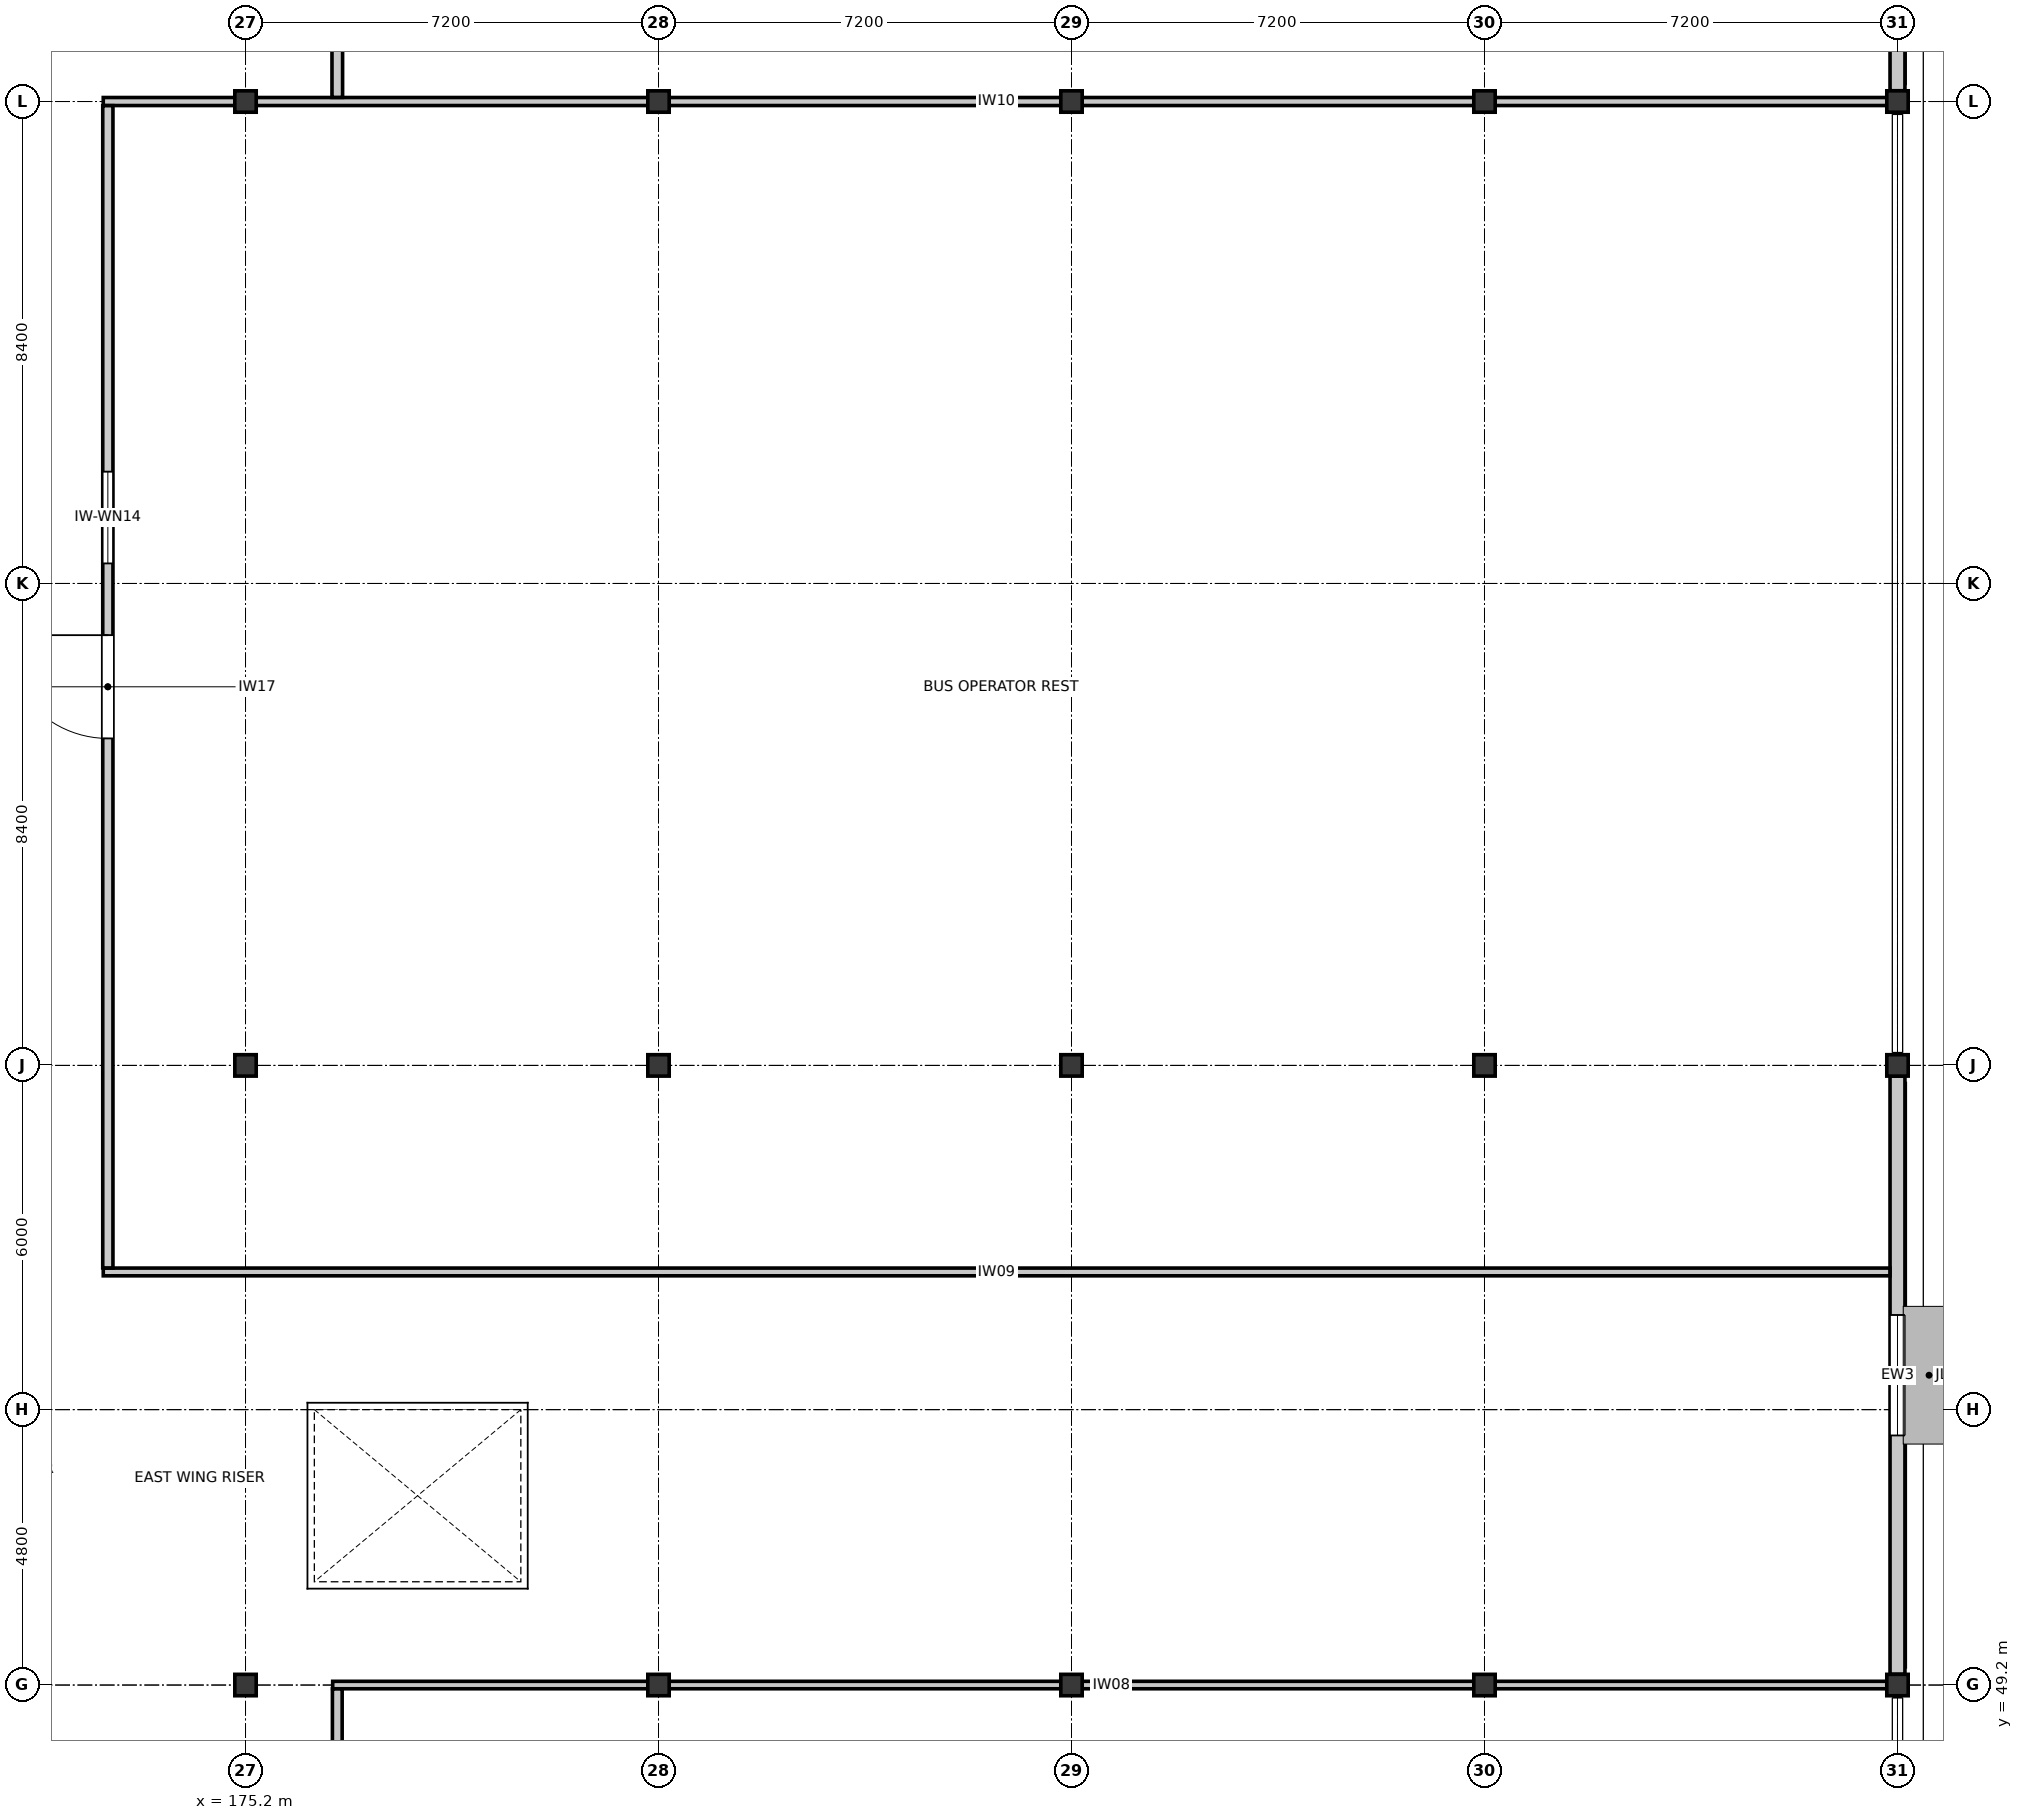
"""IFC4 building model, lengths in metres.
Left out: names, types, materials, properties, quantities, classifications, styles, units other than length and angle.
Written with IfcOpenShell. Run it as: python <this file> out.ifc"""

import sys

from ifc_helpers import new_model, si_unit, direction, frame, frame_2d, origin, origin_2d, place, context, subcontext, project, spatial, rectangle, i_section, extrude, element, fill, save


model = new_model("IFC4")
c1 = context("Model", 3, precision=1e-05, world=origin(), true_north=direction((0.0, 1.0)))
c2 = subcontext(c1, "Body", "Model", "MODEL_VIEW")
j1 = project(units=[si_unit("LENGTHUNIT", "METRE"), si_unit("PLANEANGLEUNIT", "RADIAN")], contexts=[c1])
p1 = place(None, origin())
s1 = spatial("IfcSite", under=j1, at=p1, CompositionType="ELEMENT")
p2 = place(p1, origin())
s2 = spatial("IfcBuilding", under=s1, at=p2, CompositionType="ELEMENT")
p3 = place(p2, frame((0.0, 0.0, 5.4)))
s3 = spatial("IfcBuildingStorey", under=s2, at=p3, CompositionType="ELEMENT", Elevation=5.4)
for number, where, z_axis, x_axis in (
    (1, (175.2, 49.2, 0.0), (0.0, 0.0, 1.0), (1.0, 0.0, 0.0)),
    (2, (175.2, 60.0, 0.0), (0.0, 0.0, 1.0), (1.0, 0.0, 0.0)),
    (3, (175.2, 76.8, 0.0), (0.0, 0.0, 1.0), (1.0, 0.0, 0.0)),
    (4, (182.4, 49.2, 0.0), (0.0, 0.0, 1.0), (1.0, 0.0, 0.0)),
    (5, (182.4, 60.0, 0.0), (0.0, 0.0, 1.0), (1.0, 0.0, 0.0)),
    (6, (182.4, 76.8, 0.0), (0.0, 0.0, 1.0), (1.0, 0.0, 0.0)),
    (7, (189.6, 49.2, 0.0), (0.0, 0.0, 1.0), (1.0, 0.0, 0.0)),
    (8, (189.6, 60.0, 0.0), (0.0, 0.0, 1.0), (1.0, 0.0, 0.0)),
    (9, (189.6, 76.8, 0.0), (0.0, 0.0, 1.0), (1.0, 0.0, 0.0)),
    (10, (196.8, 49.2, 0.0), (0.0, 0.0, 1.0), (1.0, 0.0, 0.0)),
    (11, (196.8, 60.0, 0.0), (0.0, 0.0, 1.0), (1.0, 0.0, 0.0)),
    (12, (196.8, 76.8, 0.0), (0.0, 0.0, 1.0), (1.0, 0.0, 0.0)),
    (13, (204.0, 49.2, 0.0), (0.0, 0.0, 1.0), (1.0, 0.0, 0.0)),
    (14, (204.0, 60.0, 0.0), (0.0, 0.0, 1.0), (1.0, 0.0, 0.0)),
    (15, (204.0, 76.8, 0.0), (0.0, 0.0, 1.0), (1.0, 0.0, 0.0)),
):
    element("IfcColumn", number, at=place(p3, frame(where, z_axis=z_axis, x_axis=x_axis)), inside=s3, PredefinedType="COLUMN", context=c2, shape_type="SweptSolid", body=[
        extrude(i_section(OverallWidth=0.373, OverallDepth=0.373, WebThickness=0.016, FlangeThickness=0.026, FilletRadius=0.015, at=origin_2d()), origin(), (0.0, 0.0, 1.0), 3.9),
    ])
p4 = place(p3, frame((204.0, 59.812, 0.0), z_axis=(0.0, 0.0, 1.0), x_axis=(0.0, -1.0, 0.0)))
e16 = element("IfcWall", 16, at=p4, inside=s3, PredefinedType="STANDARD", context=c2, shape_type="SweptSolid", body=[
    extrude(rectangle(XDim=10.424, YDim=0.26, at=frame_2d((5.212, 0.0))), origin(), (0.0, 0.0, 1.0), 3.043),
])
p5 = place(p4, frame((4.162, 0.0, 0.9)))
e17 = element("IfcOpeningElement", 17, at=p5, cuts=e16, PredefinedType="OPENING", context=c2, shape_type="SweptSolid", body=[
    extrude(rectangle(XDim=2.1, YDim=1.5, at=frame_2d((1.05, 0.75))), frame((0.0, 0.14, 0.0), z_axis=(0.0, -1.0, 0.0), x_axis=(1.0, 0.0, 0.0)), (0.0, 0.0, 1.0), 0.28),
])
p6 = place(p3, frame((204.0, 83.812, 0.0), z_axis=(0.0, 0.0, 1.0), x_axis=(0.0, -1.0, 0.0)))
e18 = element("IfcWall", 18, at=p6, inside=s3, PredefinedType="STANDARD", context=c2, shape_type="SweptSolid", body=[
    extrude(rectangle(XDim=6.824, YDim=0.26, at=frame_2d((3.412, 0.0))), origin(), (0.0, 0.0, 1.0), 3.043),
])
p7 = place(p6, frame((2.662, 0.0, 0.9)))
e19 = element("IfcOpeningElement", 19, at=p7, cuts=e18, PredefinedType="OPENING", context=c2, shape_type="SweptSolid", body=[
    extrude(rectangle(XDim=1.5, YDim=1.5, at=frame_2d((0.75, 0.75))), frame((0.0, 0.14, 0.0), z_axis=(0.0, -1.0, 0.0), x_axis=(1.0, 0.0, 0.0)), (0.0, 0.0, 1.0), 0.28),
])
p8 = place(p3, frame((176.72, 49.2, 0.0), z_axis=(0.0, 0.0, 1.0), x_axis=(1.0, 0.0, 0.0)))
e20 = element("IfcWall", 20, at=p8, inside=s3, PredefinedType="PARTITIONING", context=c2, shape_type="SweptSolid", body=[
    extrude(rectangle(XDim=27.148, YDim=0.13, at=frame_2d((13.574, 0.0))), origin(), (0.0, 0.0, 1.0), 3.038),
])
p9 = place(p3, frame((203.868, 56.4, 0.0), z_axis=(0.0, 0.0, 1.0), x_axis=(-1.0, 0.0, 0.0)))
e21 = element("IfcWall", 21, at=p9, inside=s3, PredefinedType="PARTITIONING", context=c2, shape_type="SweptSolid", body=[
    extrude(rectangle(XDim=31.148, YDim=0.135, at=frame_2d((15.574, 0.0))), origin(), (0.0, 0.0, 1.0), 3.038),
])
p10 = place(p3, frame((172.72, 76.8, 0.0), z_axis=(0.0, 0.0, 1.0), x_axis=(1.0, 0.0, 0.0)))
e22 = element("IfcWall", 22, at=p10, inside=s3, PredefinedType="PARTITIONING", context=c2, shape_type="SweptSolid", body=[
    extrude(rectangle(XDim=31.148, YDim=0.14, at=frame_2d((15.574, 0.0))), origin(), (0.0, 0.0, 1.0), 3.038),
])
p11 = place(p3, frame((176.8, 13.264, 0.0), z_axis=(0.0, 0.0, 1.0), x_axis=(0.0, 1.0, 0.0)))
e23 = element("IfcWall", 23, at=p11, inside=s3, PredefinedType="PARTITIONING", context=c2, shape_type="SweptSolid", body=[
    extrude(rectangle(XDim=35.869, YDim=0.17, at=frame_2d((17.935, 0.0))), origin(), (0.0, 0.0, 1.0), 3.038),
])
p12 = place(p11, frame((17.104, 0.0, 0.0)))
e24 = element("IfcOpeningElement", 24, at=p12, cuts=e23, PredefinedType="OPENING", context=c2, shape_type="SweptSolid", body=[
    extrude(rectangle(XDim=1.66, YDim=2.28, at=frame_2d((0.83, 1.14))), frame((0.0, 0.095, 0.0), z_axis=(0.0, -1.0, 0.0), x_axis=(1.0, 0.0, 0.0)), (0.0, 0.0, 1.0), 0.19),
])
p13 = place(p11, frame((20.014, 0.0, 0.95)))
e25 = element("IfcOpeningElement", 25, at=p13, cuts=e23, PredefinedType="OPENING", context=c2, shape_type="SweptSolid", body=[
    extrude(rectangle(XDim=1.3, YDim=1.45, at=frame_2d((0.65, 0.725))), frame((0.0, 0.095, 0.0), z_axis=(0.0, -1.0, 0.0), x_axis=(1.0, 0.0, 0.0)), (0.0, 0.0, 1.0), 0.19),
])
p14 = place(p3, frame((172.8, 56.47, 0.0), z_axis=(0.0, 0.0, 1.0), x_axis=(0.0, 1.0, 0.0)))
e26 = element("IfcWall", 26, at=p14, inside=s3, PredefinedType="PARTITIONING", context=c2, shape_type="SweptSolid", body=[
    extrude(rectangle(XDim=20.258, YDim=0.178, at=frame_2d((10.129, 0.0))), origin(), (0.0, 0.0, 1.0), 3.038),
])
p15 = place(p14, frame((9.229, 0.0, 0.0)))
e27 = element("IfcOpeningElement", 27, at=p15, cuts=e26, PredefinedType="OPENING", context=c2, shape_type="SweptSolid", body=[
    extrude(rectangle(XDim=1.8, YDim=2.28, at=frame_2d((0.9, 1.14))), frame((0.0, 0.099, 0.0), z_axis=(0.0, -1.0, 0.0), x_axis=(1.0, 0.0, 0.0)), (0.0, 0.0, 1.0), 0.198),
])
p16 = place(p14, frame((12.279, 0.0, 0.95)))
e28 = element("IfcOpeningElement", 28, at=p16, cuts=e26, PredefinedType="OPENING", context=c2, shape_type="SweptSolid", body=[
    extrude(rectangle(XDim=1.6, YDim=1.45, at=frame_2d((0.8, 0.725))), frame((0.0, 0.099, 0.0), z_axis=(0.0, -1.0, 0.0), x_axis=(1.0, 0.0, 0.0)), (0.0, 0.0, 1.0), 0.198),
])
p17 = place(p3, frame((176.8, 76.872, 0.0), z_axis=(0.0, 0.0, 1.0), x_axis=(0.0, 1.0, 0.0)))
e29 = element("IfcWall", 29, at=p17, inside=s3, PredefinedType="PARTITIONING", context=c2, shape_type="SweptSolid", body=[
    extrude(rectangle(XDim=38.576, YDim=0.185, at=frame_2d((19.288, 0.0))), origin(), (0.0, 0.0, 1.0), 3.038),
])
p18 = place(p17, frame((18.813, 0.0, 0.0)))
e30 = element("IfcOpeningElement", 30, at=p18, cuts=e29, PredefinedType="OPENING", context=c2, shape_type="SweptSolid", body=[
    extrude(rectangle(XDim=0.95, YDim=2.34, at=frame_2d((0.475, 1.17))), frame((0.0, 0.103, 0.0), z_axis=(0.0, -1.0, 0.0), x_axis=(1.0, 0.0, 0.0)), (0.0, 0.0, 1.0), 0.205),
])
p19 = place(p17, frame((21.013, 0.0, 0.95)))
e31 = element("IfcOpeningElement", 31, at=p19, cuts=e29, PredefinedType="OPENING", context=c2, shape_type="SweptSolid", body=[
    extrude(rectangle(XDim=2.0, YDim=1.45, at=frame_2d((1.0, 0.725))), frame((0.0, 0.103, 0.0), z_axis=(0.0, -1.0, 0.0), x_axis=(1.0, 0.0, 0.0)), (0.0, 0.0, 1.0), 0.205),
])
p20 = place(p5, origin())
e32 = element("IfcWindow", 32, at=p20, inside=s3, PartitioningType="SINGLE_PANEL", PredefinedType="WINDOW", context=c2, shape_type="SweptSolid", body=[
    extrude(rectangle(XDim=2.1, YDim=1.5, at=frame_2d((1.05, 0.75))), frame((0.0, 0.03, 0.0), z_axis=(0.0, -1.0, 0.0), x_axis=(1.0, 0.0, 0.0)), (0.0, 0.0, 1.0), 0.06),
])
fill(e17, e32)
p21 = place(p15, origin())
e33 = element("IfcDoor", 33, at=p21, inside=s3, OperationType="SINGLE_SWING_RIGHT", PredefinedType="DOOR", context=c2, shape_type="SweptSolid", body=[
    extrude(rectangle(XDim=1.8, YDim=2.28, at=frame_2d((0.9, 1.14))), frame((0.0, 0.025, 0.0), z_axis=(0.0, -1.0, 0.0), x_axis=(1.0, 0.0, 0.0)), (0.0, 0.0, 1.0), 0.05),
])
fill(e27, e33)
p22 = place(p16, origin())
e34 = element("IfcWindow", 34, at=p22, inside=s3, PartitioningType="SINGLE_PANEL", PredefinedType="WINDOW", context=c2, shape_type="SweptSolid", body=[
    extrude(rectangle(XDim=1.6, YDim=1.45, at=frame_2d((0.8, 0.725))), frame((0.0, 0.03, 0.0), z_axis=(0.0, -1.0, 0.0), x_axis=(1.0, 0.0, 0.0)), (0.0, 0.0, 1.0), 0.06),
])
fill(e28, e34)
save(model, sys.argv[1])
